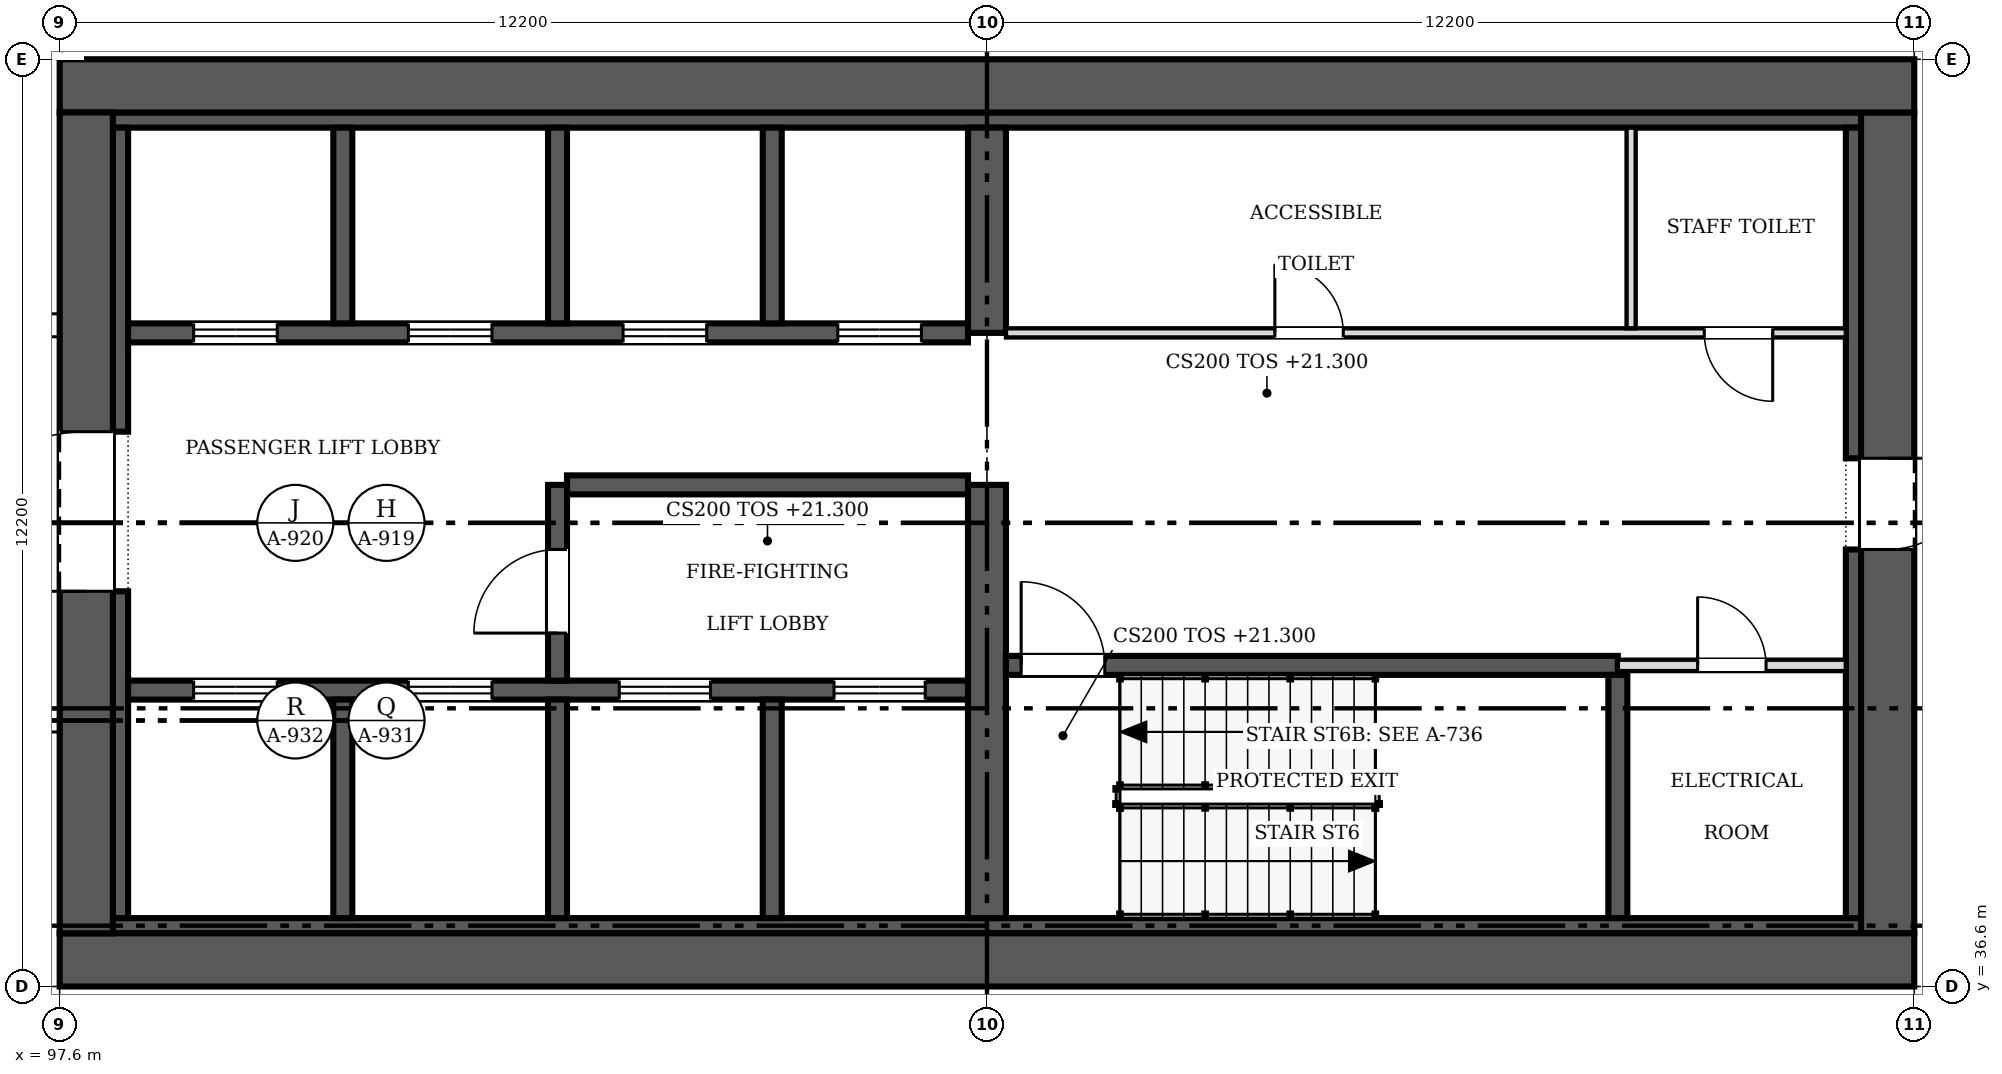
"""IFC4 building model, lengths in metres.
Left out: names, types, materials, properties, quantities, classifications, styles, units other than length and angle.
Written with IfcOpenShell. Run it as: python <this file> out.ifc"""

import sys

from ifc_helpers import new_model, si_unit, direction, frame, frame_2d, origin, place, context, subcontext, project, spatial, rectangle, extrude, source, transform, mapped, element, fill, save


model = new_model("IFC4")
c1 = context("Model", 3, precision=1e-05, world=origin(), true_north=direction((0.0, 1.0)))
c2 = subcontext(c1, "Body", "Model", "MODEL_VIEW")
j1 = project(units=[si_unit("LENGTHUNIT", "METRE"), si_unit("PLANEANGLEUNIT", "RADIAN")], contexts=[c1])
p1 = place(None, origin())
s1 = spatial("IfcSite", under=j1, at=p1, CompositionType="ELEMENT")
p2 = place(p1, origin())
s2 = spatial("IfcBuilding", under=s1, at=p2, CompositionType="ELEMENT")
p3 = place(p2, frame((0.0, 0.0, 21.3)))
s3 = spatial("IfcBuildingStorey", under=s2, at=p3, CompositionType="ELEMENT", Elevation=21.3)
p4 = place(p3, frame((122.0, 36.95, 0.0), z_axis=(0.0, 0.0, 1.0), x_axis=(-1.0, 0.0, 0.0)))
e1 = element("IfcWall", 1, at=p4, inside=s3, PredefinedType="SHEAR", context=c2, shape_type="SweptSolid", body=[
    extrude(rectangle(XDim=24.4, YDim=0.7, at=frame_2d((12.2, 0.0))), origin(), (0.0, 0.0, 1.0), 4.5),
])
p5 = place(p3, frame((97.95, 37.3, 0.0), z_axis=(0.0, 0.0, 1.0), x_axis=(0.0, 1.0, 0.0)))
e2 = element("IfcWall", 2, at=p5, inside=s3, PredefinedType="SHEAR", context=c2, shape_type="SweptSolid", body=[
    extrude(rectangle(XDim=10.8, YDim=0.7, at=frame_2d((5.4, 0.0))), origin(), (0.0, 0.0, 1.0), 4.5),
])
m1 = source(origin(), c2, "Body", "SweptSolid", [
    extrude(rectangle(XDim=2.1, YDim=2.4, at=frame_2d((1.05, 1.2))), frame((0.0, 0.36, 0.0), z_axis=(0.0, -1.0, 0.0), x_axis=(1.0, 0.0, 0.0)), (0.0, 0.0, 1.0), 0.72),
])
p6 = place(p5, frame((4.5, 0.0, 0.0)))
e3 = element("IfcOpeningElement", 3, at=p6, cuts=e2, PredefinedType="OPENING", context=c2, shape_type="MappedRepresentation", body=[
    mapped(m1, transform((0.0, 0.0, 0.0), scale=1.0)),
])
p7 = place(p3, frame((97.6, 48.45, 0.0), z_axis=(0.0, 0.0, 1.0), x_axis=(1.0, 0.0, 0.0)))
e4 = element("IfcWall", 4, at=p7, inside=s3, PredefinedType="SHEAR", context=c2, shape_type="SweptSolid", body=[
    extrude(rectangle(XDim=24.4, YDim=0.7, at=frame_2d((12.2, 0.0))), origin(), (0.0, 0.0, 1.0), 4.5),
])
p8 = place(p3, frame((121.65, 48.1, 0.0), z_axis=(0.0, 0.0, 1.0), x_axis=(0.0, -1.0, 0.0)))
e5 = element("IfcWall", 5, at=p8, inside=s3, PredefinedType="SHEAR", context=c2, shape_type="SweptSolid", body=[
    extrude(rectangle(XDim=10.8, YDim=0.7, at=frame_2d((5.4, 0.0))), origin(), (0.0, 0.0, 1.0), 4.5),
])
m2 = source(origin(), c2, "Body", "SweptSolid", [
    extrude(rectangle(XDim=1.2, YDim=2.1, at=frame_2d((0.6, 1.05))), frame((0.0, 0.36, 0.0), z_axis=(0.0, -1.0, 0.0), x_axis=(1.0, 0.0, 0.0)), (0.0, 0.0, 1.0), 0.72),
])
p9 = place(p8, frame((4.55, 0.0, 0.0)))
e6 = element("IfcOpeningElement", 6, at=p9, cuts=e5, PredefinedType="OPENING", context=c2, shape_type="MappedRepresentation", body=[
    mapped(m2, transform((0.0, 0.0, 0.0), scale=1.0)),
])
for number, where, z_axis, x_axis in (
    (7, (98.3, 37.4, 0.0), (0.0, 0.0, 1.0), (1.0, 0.0, 0.0)),
    (8, (98.3, 48.0, 0.0), (0.0, 0.0, 1.0), (1.0, 0.0, 0.0)),
):
    element("IfcWall", number, at=place(p3, frame(where, z_axis=z_axis, x_axis=x_axis)), inside=s3, PredefinedType="SOLIDWALL", context=c2, shape_type="SweptSolid", body=[
        extrude(rectangle(XDim=23.0, YDim=0.2, at=frame_2d((11.5, 0.0))), origin(), (0.0, 0.0, 1.0), 4.5),
    ])
p10 = place(p3, frame((98.4, 37.5, 0.0), z_axis=(0.0, 0.0, 1.0), x_axis=(0.0, 1.0, 0.0)))
e9 = element("IfcWall", 9, at=p10, inside=s3, PredefinedType="SOLIDWALL", context=c2, shape_type="SweptSolid", body=[
    extrude(rectangle(XDim=4.3, YDim=0.2, at=frame_2d((2.15, 0.0))), origin(), (0.0, 0.0, 1.0), 4.5),
])
p11 = place(p3, frame((98.4, 43.9, 0.0), z_axis=(0.0, 0.0, 1.0), x_axis=(0.0, 1.0, 0.0)))
e10 = element("IfcWall", 10, at=p11, inside=s3, PredefinedType="SOLIDWALL", context=c2, shape_type="SweptSolid", body=[
    extrude(rectangle(XDim=4.0, YDim=0.2, at=frame_2d((2.0, 0.0))), origin(), (0.0, 0.0, 1.0), 4.5),
])
p12 = place(p3, frame((121.2, 37.5, 0.0), z_axis=(0.0, 0.0, 1.0), x_axis=(0.0, 1.0, 0.0)))
e11 = element("IfcWall", 11, at=p12, inside=s3, PredefinedType="SOLIDWALL", context=c2, shape_type="SweptSolid", body=[
    extrude(rectangle(XDim=4.85, YDim=0.2, at=frame_2d((2.425, 0.0))), origin(), (0.0, 0.0, 1.0), 4.5),
])
p13 = place(p3, frame((121.2, 43.55, 0.0), z_axis=(0.0, 0.0, 1.0), x_axis=(0.0, 1.0, 0.0)))
e12 = element("IfcWall", 12, at=p13, inside=s3, PredefinedType="SOLIDWALL", context=c2, shape_type="SweptSolid", body=[
    extrude(rectangle(XDim=4.35, YDim=0.2, at=frame_2d((2.175, 0.0))), origin(), (0.0, 0.0, 1.0), 4.5),
])
p14 = place(p3, frame((109.8, 37.5, 0.0), z_axis=(0.0, 0.0, 1.0), x_axis=(0.0, 1.0, 0.0)))
e13 = element("IfcWall", 13, at=p14, inside=s3, PredefinedType="SHEAR", context=c2, shape_type="SweptSolid", body=[
    extrude(rectangle(XDim=5.7, YDim=0.5, at=frame_2d((2.85, 0.0))), origin(), (0.0, 0.0, 1.0), 4.5),
])
p15 = place(p3, frame((109.8, 45.2, 0.0), z_axis=(0.0, 0.0, 1.0), x_axis=(0.0, 1.0, 0.0)))
e14 = element("IfcWall", 14, at=p15, inside=s3, PredefinedType="SHEAR", context=c2, shape_type="SweptSolid", body=[
    extrude(rectangle(XDim=2.7, YDim=0.5, at=frame_2d((1.35, 0.0))), origin(), (0.0, 0.0, 1.0), 4.5),
])
p16 = place(p3, frame((98.5, 40.5, 0.0), z_axis=(0.0, 0.0, 1.0), x_axis=(1.0, 0.0, 0.0)))
e15 = element("IfcWall", 15, at=p16, inside=s3, PredefinedType="SOLIDWALL", context=c2, shape_type="SweptSolid", body=[
    extrude(rectangle(XDim=11.05, YDim=0.25, at=frame_2d((5.525, 0.0))), origin(), (0.0, 0.0, 1.0), 4.5),
])
m3 = source(origin(), c2, "Body", "SweptSolid", [
    extrude(rectangle(XDim=1.1, YDim=2.1, at=frame_2d((0.55, 1.05))), frame((0.0, 0.135, 0.0), z_axis=(0.0, -1.0, 0.0), x_axis=(1.0, 0.0, 0.0)), (0.0, 0.0, 1.0), 0.27),
])
p17 = place(p16, frame((0.863, 0.0, 0.0)))
e16 = element("IfcOpeningElement", 16, at=p17, cuts=e15, PredefinedType="OPENING", context=c2, shape_type="MappedRepresentation", body=[
    mapped(m3, transform((0.0, 0.0, 0.0), scale=1.0)),
])
p18 = place(p16, frame((3.688, 0.0, 0.0)))
e17 = element("IfcOpeningElement", 17, at=p18, cuts=e15, PredefinedType="OPENING", context=c2, shape_type="MappedRepresentation", body=[
    mapped(m3, transform((0.0, 0.0, 0.0), scale=1.0)),
])
m4 = source(origin(), c2, "Body", "SweptSolid", [
    extrude(rectangle(XDim=1.2, YDim=2.1, at=frame_2d((0.6, 1.05))), frame((0.0, 0.135, 0.0), z_axis=(0.0, -1.0, 0.0), x_axis=(1.0, 0.0, 0.0)), (0.0, 0.0, 1.0), 0.27),
])
p19 = place(p16, frame((6.462, 0.0, 0.0)))
e18 = element("IfcOpeningElement", 18, at=p19, cuts=e15, PredefinedType="OPENING", context=c2, shape_type="MappedRepresentation", body=[
    mapped(m4, transform((0.0, 0.0, 0.0), scale=1.0)),
])
p20 = place(p16, frame((9.288, 0.0, 0.0)))
e19 = element("IfcOpeningElement", 19, at=p20, cuts=e15, PredefinedType="OPENING", context=c2, shape_type="MappedRepresentation", body=[
    mapped(m4, transform((0.0, 0.0, 0.0), scale=1.0)),
])
p21 = place(p3, frame((109.55, 45.2, 0.0), z_axis=(0.0, 0.0, 1.0), x_axis=(-1.0, 0.0, 0.0)))
e20 = element("IfcWall", 20, at=p21, inside=s3, PredefinedType="SOLIDWALL", context=c2, shape_type="SweptSolid", body=[
    extrude(rectangle(XDim=11.05, YDim=0.25, at=frame_2d((5.525, 0.0))), origin(), (0.0, 0.0, 1.0), 4.5),
])
p22 = place(p21, frame((9.087, 0.0, 0.0)))
e21 = element("IfcOpeningElement", 21, at=p22, cuts=e20, PredefinedType="OPENING", context=c2, shape_type="MappedRepresentation", body=[
    mapped(m3, transform((0.0, 0.0, 0.0), scale=1.0)),
])
p23 = place(p21, frame((6.262, 0.0, 0.0)))
e22 = element("IfcOpeningElement", 22, at=p23, cuts=e20, PredefinedType="OPENING", context=c2, shape_type="MappedRepresentation", body=[
    mapped(m3, transform((0.0, 0.0, 0.0), scale=1.0)),
])
p24 = place(p21, frame((3.438, 0.0, 0.0)))
e23 = element("IfcOpeningElement", 23, at=p24, cuts=e20, PredefinedType="OPENING", context=c2, shape_type="MappedRepresentation", body=[
    mapped(m3, transform((0.0, 0.0, 0.0), scale=1.0)),
])
p25 = place(p21, frame((0.613, 0.0, 0.0)))
e24 = element("IfcOpeningElement", 24, at=p25, cuts=e20, PredefinedType="OPENING", context=c2, shape_type="MappedRepresentation", body=[
    mapped(m3, transform((0.0, 0.0, 0.0), scale=1.0)),
])
p26 = place(p3, frame((118.1, 40.825, 0.0), z_axis=(0.0, 0.0, 1.0), x_axis=(-1.0, 0.0, 0.0)))
e25 = element("IfcWall", 25, at=p26, inside=s3, PredefinedType="SOLIDWALL", context=c2, shape_type="SweptSolid", body=[
    extrude(rectangle(XDim=8.05, YDim=0.25, at=frame_2d((4.025, 0.0))), origin(), (0.0, 0.0, 1.0), 4.5),
])
p27 = place(p26, frame((6.75, 0.0, 0.0)))
e26 = element("IfcOpeningElement", 26, at=p27, cuts=e25, PredefinedType="OPENING", context=c2, shape_type="MappedRepresentation", body=[
    mapped(m3, transform((0.0, 0.0, 0.0), scale=1.0)),
])
p28 = place(p3, frame((104.15, 37.5, 0.0), z_axis=(0.0, 0.0, 1.0), x_axis=(0.0, 1.0, 0.0)))
e27 = element("IfcWall", 27, at=p28, inside=s3, PredefinedType="SOLIDWALL", context=c2, shape_type="SweptSolid", body=[
    extrude(rectangle(XDim=2.875, YDim=0.25, at=frame_2d((1.438, 0.0))), origin(), (0.0, 0.0, 1.0), 4.5),
])
p29 = place(p3, frame((104.15, 43.2, 0.0), z_axis=(0.0, 0.0, 1.0), x_axis=(0.0, -1.0, 0.0)))
e28 = element("IfcWall", 28, at=p29, inside=s3, PredefinedType="SOLIDWALL", context=c2, shape_type="SweptSolid", body=[
    extrude(rectangle(XDim=2.575, YDim=0.25, at=frame_2d((1.288, 0.0))), origin(), (0.0, 0.0, 1.0), 4.5),
])
p30 = place(p29, frame((0.85, 0.0, 0.0)))
e29 = element("IfcOpeningElement", 29, at=p30, cuts=e28, PredefinedType="OPENING", context=c2, shape_type="MappedRepresentation", body=[
    mapped(m3, transform((0.0, 0.0, 0.0), scale=1.0)),
])
p31 = place(p3, frame((104.275, 43.2, 0.0), z_axis=(0.0, 0.0, 1.0), x_axis=(1.0, 0.0, 0.0)))
e30 = element("IfcWall", 30, at=p31, inside=s3, PredefinedType="SOLIDWALL", context=c2, shape_type="SweptSolid", body=[
    extrude(rectangle(XDim=5.275, YDim=0.25, at=frame_2d((2.638, 0.0))), origin(), (0.0, 0.0, 1.0), 4.5),
])
p32 = place(p3, frame((118.1, 37.5, 0.0), z_axis=(0.0, 0.0, 1.0), x_axis=(0.0, 1.0, 0.0)))
e31 = element("IfcWall", 31, at=p32, inside=s3, PredefinedType="SOLIDWALL", context=c2, shape_type="SweptSolid", body=[
    extrude(rectangle(XDim=3.2, YDim=0.25, at=frame_2d((1.6, 0.0))), origin(), (0.0, 0.0, 1.0), 4.5),
])
for number, where, z_axis, x_axis in (
    (32, (101.325, 37.5, 0.0), (0.0, 0.0, 1.0), (0.0, 1.0, 0.0)),
    (33, (106.975, 37.5, 0.0), (0.0, 0.0, 1.0), (0.0, 1.0, 0.0)),
):
    element("IfcWall", number, at=place(p3, frame(where, z_axis=z_axis, x_axis=x_axis)), inside=s3, PredefinedType="SOLIDWALL", context=c2, shape_type="SweptSolid", body=[
        extrude(rectangle(XDim=2.875, YDim=0.25, at=frame_2d((1.438, 0.0))), origin(), (0.0, 0.0, 1.0), 4.5),
    ])
for number, where, z_axis, x_axis in (
    (34, (101.325, 45.325, 0.0), (0.0, 0.0, 1.0), (0.0, 1.0, 0.0)),
    (35, (104.15, 45.325, 0.0), (0.0, 0.0, 1.0), (0.0, 1.0, 0.0)),
    (36, (106.975, 45.325, 0.0), (0.0, 0.0, 1.0), (0.0, 1.0, 0.0)),
):
    element("IfcWall", number, at=place(p3, frame(where, z_axis=z_axis, x_axis=x_axis)), inside=s3, PredefinedType="SOLIDWALL", context=c2, shape_type="SweptSolid", body=[
        extrude(rectangle(XDim=2.575, YDim=0.25, at=frame_2d((1.288, 0.0))), origin(), (0.0, 0.0, 1.0), 4.5),
    ])
p33 = place(p3, frame((110.05, 45.2, 0.0), z_axis=(0.0, 0.0, 1.0), x_axis=(1.0, 0.0, 0.0)))
e37 = element("IfcWall", 37, at=p33, inside=s3, PredefinedType="PARTITIONING", context=c2, shape_type="SweptSolid", body=[
    extrude(rectangle(XDim=11.05, YDim=0.12, at=frame_2d((5.525, 0.0))), origin(), (0.0, 0.0, 1.0), 4.3),
])
m5 = source(origin(), c2, "Body", "SweptSolid", [
    extrude(rectangle(XDim=0.9, YDim=2.1, at=frame_2d((0.45, 1.05))), frame((0.0, 0.07, 0.0), z_axis=(0.0, -1.0, 0.0), x_axis=(1.0, 0.0, 0.0)), (0.0, 0.0, 1.0), 0.14),
])
p34 = place(p33, frame((3.538, 0.0, 0.0)))
e38 = element("IfcOpeningElement", 38, at=p34, cuts=e37, PredefinedType="OPENING", context=c2, shape_type="MappedRepresentation", body=[
    mapped(m5, transform((0.0, 0.0, 0.0), scale=1.0)),
])
p35 = place(p33, frame((9.188, 0.0, 0.0)))
e39 = element("IfcOpeningElement", 39, at=p35, cuts=e37, PredefinedType="OPENING", context=c2, shape_type="MappedRepresentation", body=[
    mapped(m5, transform((0.0, 0.0, 0.0), scale=1.0)),
])
p36 = place(p3, frame((121.1, 40.825, 0.0), z_axis=(0.0, 0.0, 1.0), x_axis=(-1.0, 0.0, 0.0)))
e40 = element("IfcWall", 40, at=p36, inside=s3, PredefinedType="PARTITIONING", context=c2, shape_type="SweptSolid", body=[
    extrude(rectangle(XDim=3.0, YDim=0.15, at=frame_2d((1.5, 0.0))), origin(), (0.0, 0.0, 1.0), 4.3),
])
m6 = source(origin(), c2, "Body", "SweptSolid", [
    extrude(rectangle(XDim=0.9, YDim=2.1, at=frame_2d((0.45, 1.05))), frame((0.0, 0.085, 0.0), z_axis=(0.0, -1.0, 0.0), x_axis=(1.0, 0.0, 0.0)), (0.0, 0.0, 1.0), 0.17),
])
p37 = place(p36, frame((1.05, 0.0, 0.0)))
e41 = element("IfcOpeningElement", 41, at=p37, cuts=e40, PredefinedType="OPENING", context=c2, shape_type="MappedRepresentation", body=[
    mapped(m6, transform((0.0, 0.0, 0.0), scale=1.0)),
])
p38 = place(p3, frame((118.275, 45.26, 0.0), z_axis=(0.0, 0.0, 1.0), x_axis=(0.0, 1.0, 0.0)))
e42 = element("IfcWall", 42, at=p38, inside=s3, PredefinedType="PARTITIONING", context=c2, shape_type="SweptSolid", body=[
    extrude(rectangle(XDim=2.64, YDim=0.12, at=frame_2d((1.32, 0.0))), origin(), (0.0, 0.0, 1.0), 4.3),
])
m7 = source(origin(), c2, "Body", "SweptSolid", [
    extrude(rectangle(XDim=2.1, YDim=2.4, at=frame_2d((1.05, 1.2))), frame((0.0, 0.025, 0.0), z_axis=(0.0, -1.0, 0.0), x_axis=(1.0, 0.0, 0.0)), (0.0, 0.0, 1.0), 0.05),
])
p39 = place(p6, origin())
e43 = element("IfcDoor", 43, at=p39, inside=s3, OperationType="DOUBLE_DOOR_SINGLE_SWING", PredefinedType="DOOR", context=c2, shape_type="MappedRepresentation", body=[
    mapped(m7, transform((0.0, 0.0, 0.0), scale=1.0)),
])
fill(e3, e43)
m8 = source(origin(), c2, "Body", "SweptSolid", [
    extrude(rectangle(XDim=1.2, YDim=2.1, at=frame_2d((0.6, 1.05))), frame((0.0, 0.025, 0.0), z_axis=(0.0, -1.0, 0.0), x_axis=(1.0, 0.0, 0.0)), (0.0, 0.0, 1.0), 0.05),
])
p40 = place(p9, origin())
e44 = element("IfcDoor", 44, at=p40, inside=s3, OperationType="SINGLE_SWING_LEFT", PredefinedType="DOOR", context=c2, shape_type="MappedRepresentation", body=[
    mapped(m8, transform((0.0, 0.0, 0.0), scale=1.0)),
])
fill(e6, e44)
m9 = source(origin(), c2, "Body", "SweptSolid", [
    extrude(rectangle(XDim=1.1, YDim=2.1, at=frame_2d((0.55, 1.05))), frame((0.0, 0.025, 0.0), z_axis=(0.0, -1.0, 0.0), x_axis=(1.0, 0.0, 0.0)), (0.0, 0.0, 1.0), 0.05),
])
p41 = place(p17, origin())
e45 = element("IfcDoor", 45, at=p41, inside=s3, OperationType="DOUBLE_DOOR_SLIDING", PredefinedType="DOOR", context=c2, shape_type="MappedRepresentation", body=[
    mapped(m9, transform((0.0, 0.0, 0.0), scale=1.0)),
])
fill(e16, e45)
p42 = place(p18, origin())
e46 = element("IfcDoor", 46, at=p42, inside=s3, OperationType="DOUBLE_DOOR_SLIDING", PredefinedType="DOOR", context=c2, shape_type="MappedRepresentation", body=[
    mapped(m9, transform((0.0, 0.0, 0.0), scale=1.0)),
])
fill(e17, e46)
p43 = place(p19, origin())
e47 = element("IfcDoor", 47, at=p43, inside=s3, OperationType="DOUBLE_DOOR_SLIDING", PredefinedType="DOOR", context=c2, shape_type="MappedRepresentation", body=[
    mapped(m8, transform((0.0, 0.0, 0.0), scale=1.0)),
])
fill(e18, e47)
p44 = place(p20, origin())
e48 = element("IfcDoor", 48, at=p44, inside=s3, OperationType="DOUBLE_DOOR_SLIDING", PredefinedType="DOOR", context=c2, shape_type="MappedRepresentation", body=[
    mapped(m8, transform((0.0, 0.0, 0.0), scale=1.0)),
])
fill(e19, e48)
p45 = place(p22, origin())
e49 = element("IfcDoor", 49, at=p45, inside=s3, OperationType="DOUBLE_DOOR_SLIDING", PredefinedType="DOOR", context=c2, shape_type="MappedRepresentation", body=[
    mapped(m9, transform((0.0, 0.0, 0.0), scale=1.0)),
])
fill(e21, e49)
p46 = place(p23, origin())
e50 = element("IfcDoor", 50, at=p46, inside=s3, OperationType="DOUBLE_DOOR_SLIDING", PredefinedType="DOOR", context=c2, shape_type="MappedRepresentation", body=[
    mapped(m9, transform((0.0, 0.0, 0.0), scale=1.0)),
])
fill(e22, e50)
p47 = place(p24, origin())
e51 = element("IfcDoor", 51, at=p47, inside=s3, OperationType="DOUBLE_DOOR_SLIDING", PredefinedType="DOOR", context=c2, shape_type="MappedRepresentation", body=[
    mapped(m9, transform((0.0, 0.0, 0.0), scale=1.0)),
])
fill(e23, e51)
p48 = place(p25, origin())
e52 = element("IfcDoor", 52, at=p48, inside=s3, OperationType="DOUBLE_DOOR_SLIDING", PredefinedType="DOOR", context=c2, shape_type="MappedRepresentation", body=[
    mapped(m9, transform((0.0, 0.0, 0.0), scale=1.0)),
])
fill(e24, e52)
p49 = place(p27, origin())
e53 = element("IfcDoor", 53, at=p49, inside=s3, OperationType="SINGLE_SWING_RIGHT", PredefinedType="DOOR", context=c2, shape_type="MappedRepresentation", body=[
    mapped(m9, transform((0.0, 0.0, 0.0), scale=1.0)),
])
fill(e26, e53)
p50 = place(p30, origin())
e54 = element("IfcDoor", 54, at=p50, inside=s3, OperationType="SINGLE_SWING_RIGHT", PredefinedType="DOOR", context=c2, shape_type="MappedRepresentation", body=[
    mapped(m9, transform((0.0, 0.0, 0.0), scale=1.0)),
])
fill(e29, e54)
m10 = source(origin(), c2, "Body", "SweptSolid", [
    extrude(rectangle(XDim=0.9, YDim=2.1, at=frame_2d((0.45, 1.05))), frame((0.0, 0.025, 0.0), z_axis=(0.0, -1.0, 0.0), x_axis=(1.0, 0.0, 0.0)), (0.0, 0.0, 1.0), 0.05),
])
p51 = place(p34, origin())
e55 = element("IfcDoor", 55, at=p51, inside=s3, OperationType="SINGLE_SWING_LEFT", PredefinedType="DOOR", context=c2, shape_type="MappedRepresentation", body=[
    mapped(m10, transform((0.0, 0.0, 0.0), scale=1.0)),
])
fill(e38, e55)
p52 = place(p35, origin())
e56 = element("IfcDoor", 56, at=p52, inside=s3, OperationType="SINGLE_SWING_RIGHT", PredefinedType="DOOR", context=c2, shape_type="MappedRepresentation", body=[
    mapped(m10, transform((0.0, 0.0, 0.0), scale=1.0)),
])
fill(e39, e56)
p53 = place(p37, origin())
e57 = element("IfcDoor", 57, at=p53, inside=s3, OperationType="SINGLE_SWING_RIGHT", PredefinedType="DOOR", context=c2, shape_type="MappedRepresentation", body=[
    mapped(m10, transform((0.0, 0.0, 0.0), scale=1.0)),
])
fill(e41, e57)
save(model, sys.argv[1])
